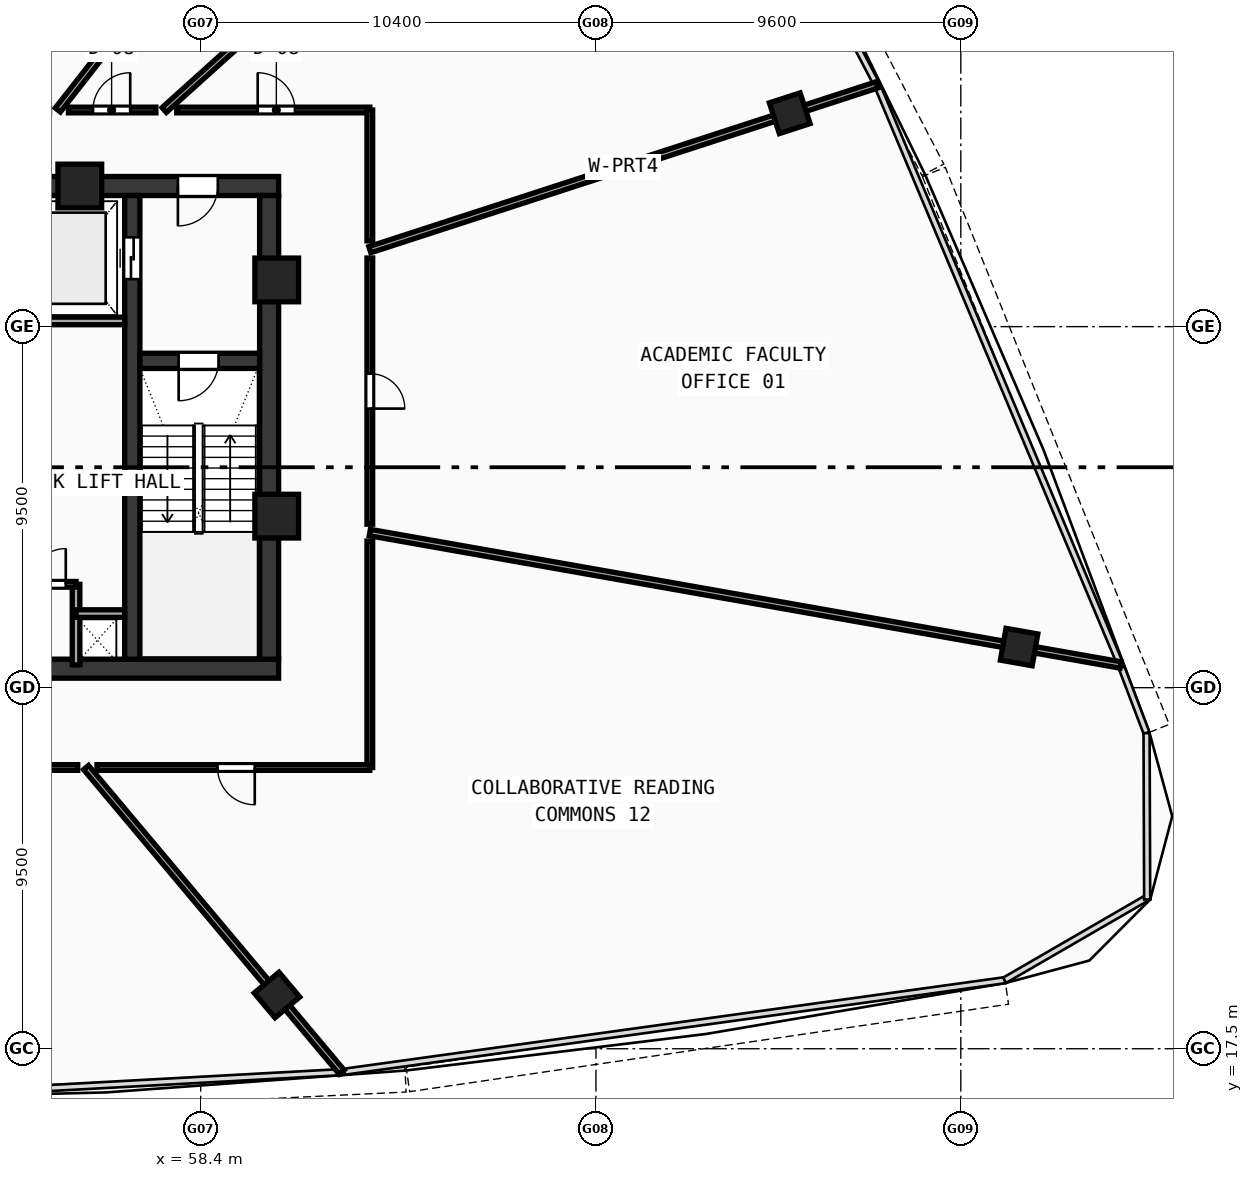
"""IFC4 building model, lengths in metres.
Left out: names, types, materials, properties, quantities, classifications, styles, units other than length and angle.
Written with IfcOpenShell. Run it as: python <this file> out.ifc"""

import sys

from ifc_helpers import new_model, si_unit, direction, frame, frame_2d, origin, origin_with_axes, origin_2d, place, context, subcontext, project, spatial, rectangle, hollow_rectangle, extrude, source, transform, mapped, element, fill, save


model = new_model("IFC4")
c1 = context("Model", 3, precision=1e-05, world=origin(), true_north=direction((0.0, 1.0)))
c2 = subcontext(c1, "Body", "Model", "MODEL_VIEW")
j1 = project(units=[si_unit("LENGTHUNIT", "METRE"), si_unit("PLANEANGLEUNIT", "RADIAN")], contexts=[c1])
p1 = place(None, origin())
s1 = spatial("IfcSite", under=j1, at=p1, CompositionType="ELEMENT")
p2 = place(p1, origin())
s2 = spatial("IfcBuilding", under=s1, at=p2, CompositionType="ELEMENT")
p3 = place(p2, frame((0.0, 0.0, 240.8)))
s3 = spatial("IfcBuildingStorey", under=s2, at=p3, CompositionType="ELEMENT", Elevation=240.8)
p4 = place(p3, frame((35.55, 27.5, 0.0), z_axis=(0.0, 0.0, 1.0), x_axis=(1.0, 0.0, 0.0)))
e1 = element("IfcWall", 1, at=p4, inside=s3, PredefinedType="SHEAR", context=c2, shape_type="SweptSolid", body=[
    extrude(rectangle(XDim=24.9, YDim=0.5, at=frame_2d((12.45, 0.0))), origin(), (0.0, 0.0, 1.0), 3.47),
])
p5 = place(p3, frame((49.2, 40.2, 0.0), z_axis=(0.0, 0.0, 1.0), x_axis=(1.0, 0.0, 0.0)))
e2 = element("IfcWall", 2, at=p5, inside=s3, PredefinedType="SHEAR", context=c2, shape_type="SweptSolid", body=[
    extrude(rectangle(XDim=11.25, YDim=0.5, at=frame_2d((5.625, 0.0))), origin(), (0.0, 0.0, 1.0), 3.47),
])
p6 = place(p5, frame((8.6, 0.0, 0.0)))
e3 = element("IfcOpeningElement", 3, at=p6, cuts=e2, PredefinedType="OPENING", context=c2, shape_type="SweptSolid", body=[
    extrude(rectangle(XDim=1.05, YDim=2.1, at=frame_2d((0.525, 1.05))), frame((0.0, 0.26, 0.0), z_axis=(0.0, -1.0, 0.0), x_axis=(1.0, 0.0, 0.0)), (0.0, 0.0, 1.0), 0.52),
])
p7 = place(p3, frame((60.2, 27.75, 0.0), z_axis=(0.0, 0.0, 1.0), x_axis=(0.0, 1.0, 0.0)))
e4 = element("IfcWall", 4, at=p7, inside=s3, PredefinedType="SHEAR", context=c2, shape_type="SweptSolid", body=[
    extrude(rectangle(XDim=12.2, YDim=0.5, at=frame_2d((6.1, 0.0))), origin(), (0.0, 0.0, 1.0), 3.47),
])
p8 = place(p3, frame((56.6, 27.75, 0.0), z_axis=(0.0, 0.0, 1.0), x_axis=(0.0, 1.0, 0.0)))
e5 = element("IfcWall", 5, at=p8, inside=s3, PredefinedType="SHEAR", context=c2, shape_type="SweptSolid", body=[
    extrude(rectangle(XDim=12.2, YDim=0.4, at=frame_2d((6.1, 0.0))), origin(), (0.0, 0.0, 1.0), 3.47),
])
p9 = place(p8, frame((10.0, 0.0, 0.0)))
e6 = element("IfcOpeningElement", 6, at=p9, cuts=e5, PredefinedType="OPENING", context=c2, shape_type="SweptSolid", body=[
    extrude(rectangle(XDim=1.1, YDim=2.1, at=frame_2d((0.55, 1.05))), frame((0.0, 0.21, 0.0), z_axis=(0.0, -1.0, 0.0), x_axis=(1.0, 0.0, 0.0)), (0.0, 0.0, 1.0), 0.42),
])
p10 = place(p3, frame((56.8, 35.6, 0.0), z_axis=(0.0, 0.0, 1.0), x_axis=(1.0, 0.0, 0.0)))
e7 = element("IfcWall", 7, at=p10, inside=s3, PredefinedType="SHEAR", context=c2, shape_type="SweptSolid", body=[
    extrude(rectangle(XDim=3.15, YDim=0.4, at=frame_2d((1.575, 0.0))), origin(), (0.0, 0.0, 1.0), 3.47),
])
p11 = place(p10, frame((1.02, 0.0, 0.0)))
e8 = element("IfcOpeningElement", 8, at=p11, cuts=e7, PredefinedType="OPENING", context=c2, shape_type="SweptSolid", body=[
    extrude(rectangle(XDim=1.05, YDim=2.1, at=frame_2d((0.525, 1.05))), frame((0.0, 0.21, 0.0), z_axis=(0.0, -1.0, 0.0), x_axis=(1.0, 0.0, 0.0)), (0.0, 0.0, 1.0), 0.42),
])
m1 = source(origin(), c2, "Body", "SweptSolid", [
    extrude(hollow_rectangle(XDim=1.15, YDim=1.15, WallThickness=0.048, at=origin_2d()), origin(), (0.0, 0.0, 1.0), 3.73),
])
for number, where, z_axis, x_axis in (
    (9, (60.4, 31.513, -0.26), (0.0, 0.0, 1.0), (1.0, 0.0, 0.0)),
    (10, (60.4, 37.729, -0.26), (0.0, 0.0, 1.0), (1.0, 0.0, 0.0)),
    (11, (55.219, 40.2, -0.26), (0.0, 0.0, 1.0), (1.0, 0.0, 0.0)),
):
    element("IfcColumn", number, at=place(p3, frame(where, z_axis=z_axis, x_axis=x_axis)), inside=s3, PredefinedType="COLUMN", context=c2, shape_type="MappedRepresentation", body=[
        mapped(m1, transform((0.0, 0.0, 0.0), scale=1.0)),
    ])
m2 = source(origin(), c2, "Body", "SweptSolid", [
    extrude(hollow_rectangle(XDim=0.85, YDim=0.85, WallThickness=0.034, at=origin_2d()), origin(), (0.0, 0.0, 1.0), 3.73),
])
for number, where, z_axis, x_axis in (
    (12, (60.407, 18.914, -0.26), (0.0, 0.0, 1.0), (0.766, 0.643, 0.0)),
    (13, (79.934, 28.069, -0.26), (0.0, 0.0, 1.0), (0.174, 0.985, 0.0)),
    (14, (73.899, 42.115, -0.26), (0.0, 0.0, 1.0), (-0.309, 0.951, 0.0)),
):
    element("IfcColumn", number, at=place(p3, frame(where, z_axis=z_axis, x_axis=x_axis)), inside=s3, PredefinedType="COLUMN", context=c2, shape_type="MappedRepresentation", body=[
        mapped(m2, transform((0.0, 0.0, 0.0), scale=1.0)),
    ])
p12 = place(p3, frame((53.68, 36.65, 0.0), z_axis=(0.0, 0.0, 1.0), x_axis=(1.0, 0.0, 0.0)))
e15 = element("IfcWall", 15, at=p12, inside=s3, PredefinedType="SOLIDWALL", context=c2, shape_type="SweptSolid", body=[
    extrude(rectangle(XDim=2.72, YDim=0.2, at=frame_2d((1.36, 0.0))), origin(), (0.0, 0.0, 1.0), 3.47),
])
p13 = place(p3, frame((55.12, 27.6, 0.0), z_axis=(0.0, 0.0, 1.0), x_axis=(0.0, 1.0, 0.0)))
e16 = element("IfcWall", 16, at=p13, inside=s3, PredefinedType="SOLIDWALL", context=c2, shape_type="SweptSolid", body=[
    extrude(rectangle(XDim=2.12, YDim=0.2, at=frame_2d((1.06, 0.0))), origin(), (0.0, 0.0, 1.0), 3.47),
])
p14 = place(p3, frame((55.12, 28.95, 0.0), z_axis=(0.0, 0.0, 1.0), x_axis=(1.0, 0.0, 0.0)))
e17 = element("IfcWall", 17, at=p14, inside=s3, PredefinedType="SOLIDWALL", context=c2, shape_type="SweptSolid", body=[
    extrude(rectangle(XDim=1.28, YDim=0.2, at=frame_2d((0.64, 0.0))), origin(), (0.0, 0.0, 1.0), 3.47),
])
p15 = place(p3, frame((51.05, 29.72, 0.0), z_axis=(0.0, 0.0, 1.0), x_axis=(1.0, 0.0, 0.0)))
e18 = element("IfcWall", 18, at=p15, inside=s3, PredefinedType="PARTITIONING", context=c2, shape_type="SweptSolid", body=[
    extrude(rectangle(XDim=4.07, YDim=0.15, at=frame_2d((2.035, 0.0))), origin(), (0.0, 0.0, 1.0), 3.47),
])
p16 = place(p15, frame((0.3, 0.0, 0.0)))
e19 = element("IfcOpeningElement", 19, at=p16, cuts=e18, PredefinedType="OPENING", context=c2, shape_type="SweptSolid", body=[
    extrude(rectangle(XDim=0.9, YDim=2.1, at=frame_2d((0.45, 1.05))), frame((0.0, 0.085, 0.0), z_axis=(0.0, -1.0, 0.0), x_axis=(1.0, 0.0, 0.0)), (0.0, 0.0, 1.0), 0.17),
])
p17 = place(p15, frame((2.86, 0.0, 0.0)))
e20 = element("IfcOpeningElement", 20, at=p17, cuts=e18, PredefinedType="OPENING", context=c2, shape_type="SweptSolid", body=[
    extrude(rectangle(XDim=0.94, YDim=2.1, at=frame_2d((0.47, 1.05))), frame((0.0, 0.085, 0.0), z_axis=(0.0, -1.0, 0.0), x_axis=(1.0, 0.0, 0.0)), (0.0, 0.0, 1.0), 0.17),
])
p18 = place(p3, frame((62.85, 38.525, 0.0), z_axis=(0.0, 0.0, 1.0), x_axis=(0.951060404644, 0.309005027011, 0.0)))
e21 = element("IfcWall", 21, at=p18, inside=s3, PredefinedType="PARTITIONING", context=c2, shape_type="SweptSolid", body=[
    extrude(rectangle(XDim=14.032, YDim=0.17, at=frame_2d((7.016, 0.0))), origin(), (0.0, 0.0, 1.0), 2.82),
])
p19 = place(p3, frame((57.44, 42.2, 0.0), z_axis=(0.0, 0.0, 1.0), x_axis=(0.743140424774, 0.669135493802, 0.0)))
e22 = element("IfcWall", 22, at=p19, inside=s3, PredefinedType="PARTITIONING", context=c2, shape_type="SweptSolid", body=[
    extrude(rectangle(XDim=17.455, YDim=0.17, at=frame_2d((8.728, 0.0))), origin(), (0.0, 0.0, 1.0), 2.82),
])
p20 = place(p3, frame((54.641, 42.2, 0.0), z_axis=(0.0, 0.0, 1.0), x_axis=(0.615664824624, 0.788008136837, 0.0)))
e23 = element("IfcWall", 23, at=p20, inside=s3, PredefinedType="PARTITIONING", context=c2, shape_type="SweptSolid", body=[
    extrude(rectangle(XDim=20.745, YDim=0.17, at=frame_2d((10.372, 0.0))), origin(), (0.0, 0.0, 1.0), 2.82),
])
p21 = place(p3, frame((55.384, 24.9, 0.0), z_axis=(0.0, 0.0, 1.0), x_axis=(0.642788120563, -0.766044014443, 0.0)))
e24 = element("IfcWall", 24, at=p21, inside=s3, PredefinedType="PARTITIONING", context=c2, shape_type="SweptSolid", body=[
    extrude(rectangle(XDim=10.462, YDim=0.17, at=frame_2d((5.231, 0.0))), origin(), (0.0, 0.0, 1.0), 2.82),
])
p22 = place(p3, frame((62.85, 31.082, 0.0), z_axis=(0.0, 0.0, 1.0), x_axis=(0.984808421785, -0.173644384824, 0.0)))
e25 = element("IfcWall", 25, at=p22, inside=s3, PredefinedType="PARTITIONING", context=c2, shape_type="SweptSolid", body=[
    extrude(rectangle(XDim=20.059, YDim=0.17, at=frame_2d((10.03, 0.0))), origin(), (0.0, 0.0, 1.0), 2.82),
])
p23 = place(p3, frame((54.92, 42.2, 0.0), z_axis=(0.0, 0.0, 1.0), x_axis=(1.0, 0.0, 0.0)))
e26 = element("IfcWall", 26, at=p23, inside=s3, PredefinedType="PARTITIONING", context=c2, shape_type="SweptSolid", body=[
    extrude(rectangle(XDim=2.3, YDim=0.15, at=frame_2d((1.15, 0.0))), origin(), (0.0, 0.0, 1.0), 2.82),
])
p24 = place(p23, frame((0.646, 0.0, 0.0)))
e27 = element("IfcOpeningElement", 27, at=p24, cuts=e26, PredefinedType="OPENING", context=c2, shape_type="SweptSolid", body=[
    extrude(rectangle(XDim=0.98, YDim=2.12, at=frame_2d((0.49, 1.06))), frame((0.0, 0.085, 0.0), z_axis=(0.0, -1.0, 0.0), x_axis=(1.0, 0.0, 0.0)), (0.0, 0.0, 1.0), 0.17),
])
p25 = place(p3, frame((57.769, 42.2, 0.0), z_axis=(0.0, 0.0, 1.0), x_axis=(1.0, 0.0, 0.0)))
e28 = element("IfcWall", 28, at=p25, inside=s3, PredefinedType="PARTITIONING", context=c2, shape_type="SweptSolid", body=[
    extrude(rectangle(XDim=5.081, YDim=0.15, at=frame_2d((2.541, 0.0))), origin(), (0.0, 0.0, 1.0), 3.12),
])
p26 = place(p25, frame((2.131, 0.0, 0.0)))
e29 = element("IfcOpeningElement", 29, at=p26, cuts=e28, PredefinedType="OPENING", context=c2, shape_type="SweptSolid", body=[
    extrude(rectangle(XDim=0.98, YDim=2.12, at=frame_2d((0.49, 1.06))), frame((0.0, 0.085, 0.0), z_axis=(0.0, -1.0, 0.0), x_axis=(1.0, 0.0, 0.0)), (0.0, 0.0, 1.0), 0.17),
])
p27 = place(p3, frame((62.85, 42.2, 0.0), z_axis=(0.0, 0.0, 1.0), x_axis=(0.0, -1.0, 0.0)))
e30 = element("IfcWall", 30, at=p27, inside=s3, PredefinedType="PARTITIONING", context=c2, shape_type="SweptSolid", body=[
    extrude(rectangle(XDim=3.444, YDim=0.15, at=frame_2d((1.722, 0.0))), origin(), (0.0, 0.0, 1.0), 3.12),
])
p28 = place(p3, frame((62.85, 38.305, 0.0), z_axis=(0.0, 0.0, 1.0), x_axis=(0.0, -1.0, 0.0)))
e31 = element("IfcWall", 31, at=p28, inside=s3, PredefinedType="PARTITIONING", context=c2, shape_type="SweptSolid", body=[
    extrude(rectangle(XDim=7.004, YDim=0.15, at=frame_2d((3.502, 0.0))), origin(), (0.0, 0.0, 1.0), 3.47),
])
p29 = place(p28, frame((3.042, 0.0, 0.0)))
e32 = element("IfcOpeningElement", 32, at=p29, cuts=e31, PredefinedType="OPENING", context=c2, shape_type="SweptSolid", body=[
    extrude(rectangle(XDim=0.92, YDim=2.1, at=frame_2d((0.46, 1.05))), frame((0.0, 0.085, 0.0), z_axis=(0.0, -1.0, 0.0), x_axis=(1.0, 0.0, 0.0)), (0.0, 0.0, 1.0), 0.17),
])
p30 = place(p3, frame((62.85, 30.858, 0.0), z_axis=(0.0, 0.0, 1.0), x_axis=(0.0, -1.0, 0.0)))
e33 = element("IfcWall", 33, at=p30, inside=s3, PredefinedType="PARTITIONING", context=c2, shape_type="SweptSolid", body=[
    extrude(rectangle(XDim=5.958, YDim=0.15, at=frame_2d((2.979, 0.0))), origin(), (0.0, 0.0, 1.0), 3.12),
])
p31 = place(p3, frame((62.85, 24.9, 0.0), z_axis=(0.0, 0.0, 1.0), x_axis=(-1.0, 0.0, 0.0)))
e34 = element("IfcWall", 34, at=p31, inside=s3, PredefinedType="PARTITIONING", context=c2, shape_type="SweptSolid", body=[
    extrude(rectangle(XDim=7.179, YDim=0.15, at=frame_2d((3.589, 0.0))), origin(), (0.0, 0.0, 1.0), 3.12),
])
p32 = place(p31, frame((3.028, 0.0, 0.0)))
e35 = element("IfcOpeningElement", 35, at=p32, cuts=e34, PredefinedType="OPENING", context=c2, shape_type="SweptSolid", body=[
    extrude(rectangle(XDim=0.98, YDim=2.12, at=frame_2d((0.49, 1.06))), frame((0.0, 0.085, 0.0), z_axis=(0.0, -1.0, 0.0), x_axis=(1.0, 0.0, 0.0)), (0.0, 0.0, 1.0), 0.17),
])
p33 = place(p3, frame((55.164, 24.9, 0.0), z_axis=(0.0, 0.0, 1.0), x_axis=(-1.0, 0.0, 0.0)))
e36 = element("IfcWall", 36, at=p33, inside=s3, PredefinedType="PARTITIONING", context=c2, shape_type="SweptSolid", body=[
    extrude(rectangle(XDim=4.579, YDim=0.15, at=frame_2d((2.289, 0.0))), origin(), (0.0, 0.0, 1.0), 2.82),
])
p34 = place(p33, frame((1.818, 0.0, 0.0)))
e37 = element("IfcOpeningElement", 37, at=p34, cuts=e36, PredefinedType="OPENING", context=c2, shape_type="SweptSolid", body=[
    extrude(rectangle(XDim=0.98, YDim=2.12, at=frame_2d((0.49, 1.06))), frame((0.0, 0.085, 0.0), z_axis=(0.0, -1.0, 0.0), x_axis=(1.0, 0.0, 0.0)), (0.0, 0.0, 1.0), 0.17),
])
m3 = source(origin(), c2, "Body", "SweptSolid", [
    extrude(rectangle(XDim=1.05, YDim=2.1, at=frame_2d((0.525, 1.05))), frame((0.0, 0.025, 0.0), z_axis=(0.0, -1.0, 0.0), x_axis=(1.0, 0.0, 0.0)), (0.0, 0.0, 1.0), 0.05),
])
p35 = place(p11, frame((1.05, 0.0, 0.0), z_axis=(0.0, 0.0, 1.0), x_axis=(-1.0, 0.0, 0.0)))
e38 = element("IfcDoor", 38, at=p35, inside=s3, OperationType="SINGLE_SWING_RIGHT", PredefinedType="DOOR", context=c2, shape_type="MappedRepresentation", body=[
    mapped(m3, transform((0.0, 0.0, 0.0), scale=1.0)),
])
fill(e8, e38)
p36 = place(p6, frame((1.05, 0.0, 0.0), z_axis=(0.0, 0.0, 1.0), x_axis=(-1.0, 0.0, 0.0)))
e39 = element("IfcDoor", 39, at=p36, inside=s3, OperationType="SINGLE_SWING_RIGHT", PredefinedType="DOOR", context=c2, shape_type="MappedRepresentation", body=[
    mapped(m3, transform((0.0, 0.0, 0.0), scale=1.0)),
])
fill(e3, e39)
m4 = source(origin(), c2, "Body", "SweptSolid", [
    extrude(rectangle(XDim=1.1, YDim=2.1, at=frame_2d((0.55, 1.05))), frame((0.0, 0.025, 0.0), z_axis=(0.0, -1.0, 0.0), x_axis=(1.0, 0.0, 0.0)), (0.0, 0.0, 1.0), 0.05),
])
p37 = place(p9, origin_with_axes())
e40 = element("IfcDoor", 40, at=p37, inside=s3, OperationType="DOUBLE_DOOR_SLIDING", PredefinedType="DOOR", context=c2, shape_type="MappedRepresentation", body=[
    mapped(m4, transform((0.0, 0.0, 0.0), scale=1.0)),
])
fill(e6, e40)
m5 = source(origin(), c2, "Body", "SweptSolid", [
    extrude(rectangle(XDim=0.94, YDim=2.1, at=frame_2d((0.47, 1.05))), frame((0.0, 0.025, 0.0), z_axis=(0.0, -1.0, 0.0), x_axis=(1.0, 0.0, 0.0)), (0.0, 0.0, 1.0), 0.05),
])
p38 = place(p17, origin_with_axes())
e41 = element("IfcDoor", 41, at=p38, inside=s3, OperationType="SINGLE_SWING_RIGHT", PredefinedType="DOOR", context=c2, shape_type="MappedRepresentation", body=[
    mapped(m5, transform((0.0, 0.0, 0.0), scale=1.0)),
])
fill(e20, e41)
m6 = source(origin(), c2, "Body", "SweptSolid", [
    extrude(rectangle(XDim=0.92, YDim=2.1, at=frame_2d((0.46, 1.05))), frame((0.0, 0.025, 0.0), z_axis=(0.0, -1.0, 0.0), x_axis=(1.0, 0.0, 0.0)), (0.0, 0.0, 1.0), 0.05),
])
p39 = place(p29, origin_with_axes())
e42 = element("IfcDoor", 42, at=p39, inside=s3, OperationType="SINGLE_SWING_RIGHT", PredefinedType="DOOR", context=c2, shape_type="MappedRepresentation", body=[
    mapped(m6, transform((0.0, 0.0, 0.0), scale=1.0)),
])
fill(e32, e42)
m7 = source(origin(), c2, "Body", "SweptSolid", [
    extrude(rectangle(XDim=0.98, YDim=2.12, at=frame_2d((0.49, 1.06))), frame((0.0, 0.025, 0.0), z_axis=(0.0, -1.0, 0.0), x_axis=(1.0, 0.0, 0.0)), (0.0, 0.0, 1.0), 0.05),
])
p40 = place(p26, origin_with_axes())
e43 = element("IfcDoor", 43, at=p40, inside=s3, OperationType="SINGLE_SWING_LEFT", PredefinedType="DOOR", context=c2, shape_type="MappedRepresentation", body=[
    mapped(m7, transform((0.0, 0.0, 0.0), scale=1.0)),
])
fill(e29, e43)
p41 = place(p24, origin_with_axes())
e44 = element("IfcDoor", 44, at=p41, inside=s3, OperationType="SINGLE_SWING_RIGHT", PredefinedType="DOOR", context=c2, shape_type="MappedRepresentation", body=[
    mapped(m7, transform((0.0, 0.0, 0.0), scale=1.0)),
])
fill(e27, e44)
p42 = place(p32, origin_with_axes())
e45 = element("IfcDoor", 45, at=p42, inside=s3, OperationType="SINGLE_SWING_LEFT", PredefinedType="DOOR", context=c2, shape_type="MappedRepresentation", body=[
    mapped(m7, transform((0.0, 0.0, 0.0), scale=1.0)),
])
fill(e35, e45)
save(model, sys.argv[1])
